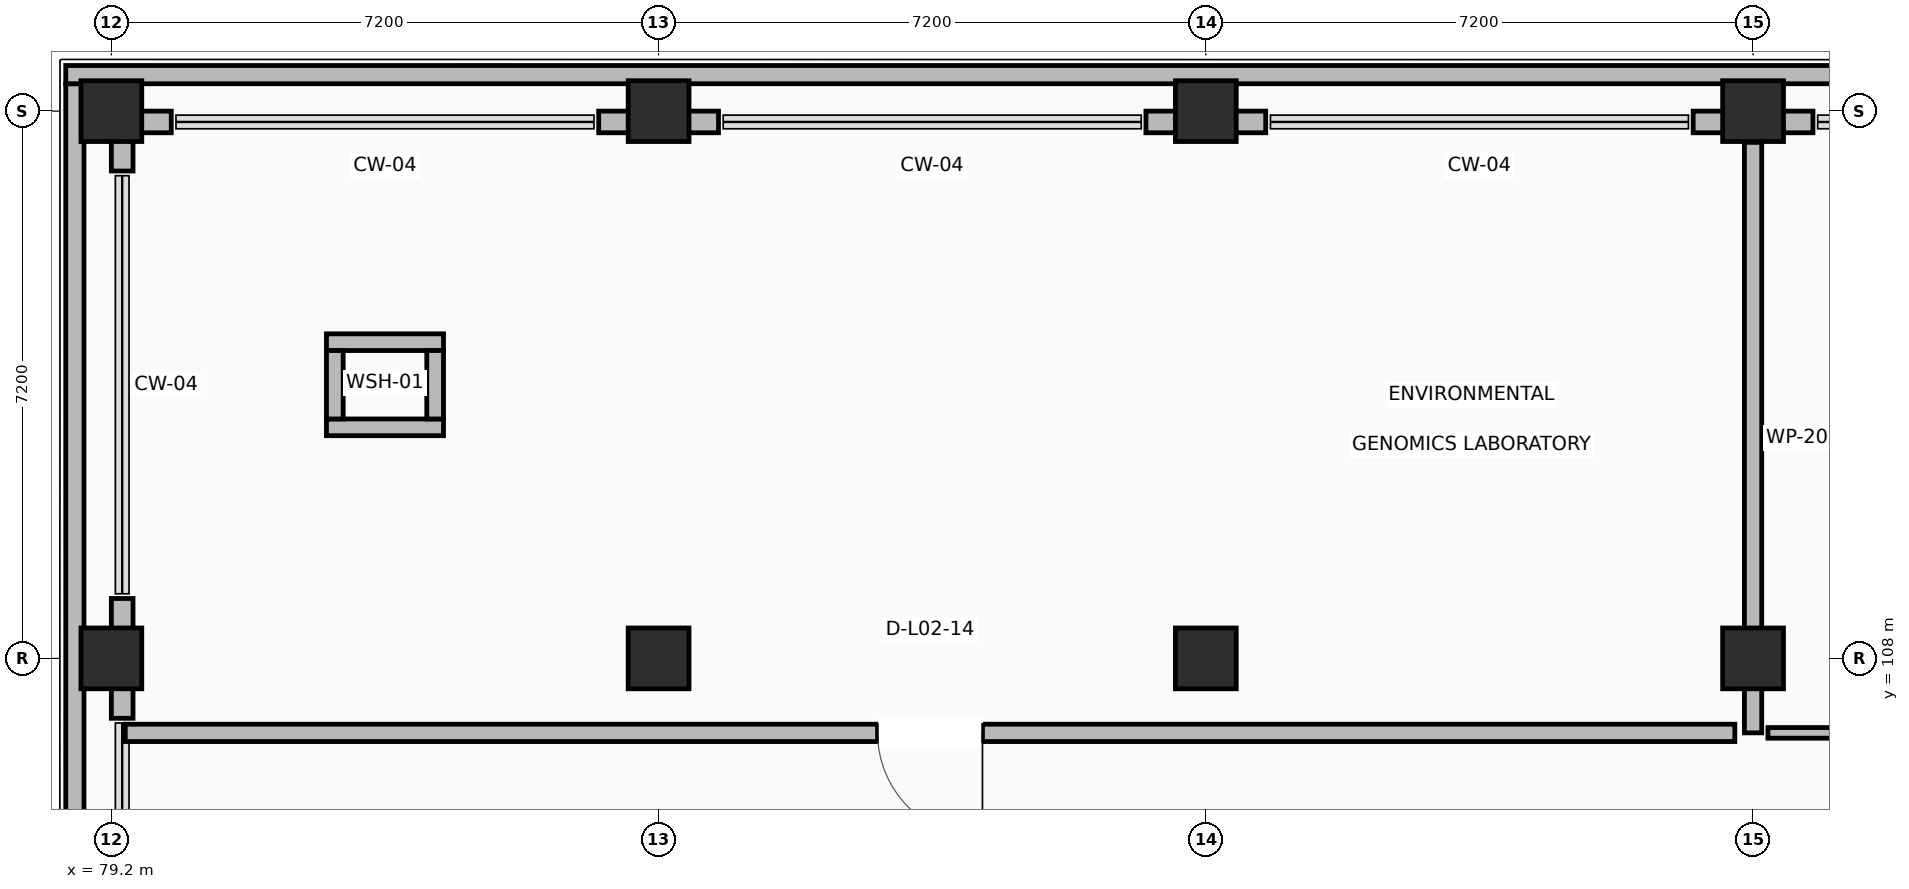
"""IFC4 building model, lengths in metres.
Left out: names, types, materials, properties, quantities, classifications, styles, units other than length and angle.
Written with IfcOpenShell. Run it as: python <this file> out.ifc"""

import sys

from ifc_helpers import new_model, si_unit, direction, frame, frame_2d, origin, origin_2d, place, context, subcontext, project, spatial, rectangle, extrude, element, fill, save


model = new_model("IFC4")
c1 = context("Model", 3, precision=1e-05, world=origin(), true_north=direction((0.0, 1.0)))
c2 = subcontext(c1, "Body", "Model", "MODEL_VIEW")
j1 = project(units=[si_unit("LENGTHUNIT", "METRE"), si_unit("PLANEANGLEUNIT", "RADIAN")], contexts=[c1])
p1 = place(None, origin())
s1 = spatial("IfcSite", under=j1, at=p1, CompositionType="ELEMENT")
p2 = place(p1, origin())
s2 = spatial("IfcBuilding", under=s1, at=p2, CompositionType="ELEMENT")
p3 = place(p2, frame((0.0, 0.0, 9.0)))
s3 = spatial("IfcBuildingStorey", under=s2, at=p3, CompositionType="ELEMENT", Elevation=9.0)
for number, where, z_axis, x_axis in (
    (1, (79.2, 108.0, 0.0), (0.0, 0.0, 1.0), (1.0, 0.0, 0.0)),
    (2, (79.2, 115.2, 0.0), (0.0, 0.0, 1.0), (1.0, 0.0, 0.0)),
    (3, (86.4, 108.0, 0.0), (0.0, 0.0, 1.0), (1.0, 0.0, 0.0)),
    (4, (86.4, 115.2, 0.0), (0.0, 0.0, 1.0), (1.0, 0.0, 0.0)),
    (5, (93.6, 108.0, 0.0), (0.0, 0.0, 1.0), (1.0, 0.0, 0.0)),
    (6, (93.6, 115.2, 0.0), (0.0, 0.0, 1.0), (1.0, 0.0, 0.0)),
    (7, (100.8, 108.0, 0.0), (0.0, 0.0, 1.0), (1.0, 0.0, 0.0)),
    (8, (100.8, 115.2, 0.0), (0.0, 0.0, 1.0), (1.0, 0.0, 0.0)),
):
    element("IfcColumn", number, at=place(p3, frame(where, z_axis=z_axis, x_axis=x_axis)), inside=s3, PredefinedType="COLUMN", context=c2, shape_type="SweptSolid", body=[
        extrude(rectangle(XDim=0.8, YDim=0.8, at=origin_2d()), origin(), (0.0, 0.0, 1.0), 4.22),
    ])
for number, where, z_axis, x_axis in (
    (9, (101.588, 115.058, 0.0), (0.0, 0.0, 1.0), (-1.0, 0.0, 0.0)),
    (10, (94.388, 115.058, 0.0), (0.0, 0.0, 1.0), (-1.0, 0.0, 0.0)),
    (11, (87.188, 115.058, 0.0), (0.0, 0.0, 1.0), (-1.0, 0.0, 0.0)),
):
    element("IfcWall", number, at=place(p3, frame(where, z_axis=z_axis, x_axis=x_axis)), inside=s3, PredefinedType="STANDARD", context=c2, shape_type="SweptSolid", body=[
        extrude(rectangle(XDim=1.576, YDim=0.285, at=frame_2d((0.788, 0.0))), origin(), (0.0, 0.0, 1.0), 3.26),
    ])
p4 = place(p3, frame((79.988, 115.058, 0.0), z_axis=(0.0, 0.0, 1.0), x_axis=(-1.0, 0.0, 0.0)))
e12 = element("IfcWall", 12, at=p4, inside=s3, PredefinedType="STANDARD", context=c2, shape_type="SweptSolid", body=[
    extrude(rectangle(XDim=0.788, YDim=0.285, at=frame_2d((0.394, 0.0))), origin(), (0.0, 0.0, 1.0), 3.26),
])
p5 = place(p3, frame((79.343, 114.915, 0.0), z_axis=(0.0, 0.0, 1.0), x_axis=(0.0, -1.0, 0.0)))
e13 = element("IfcWall", 13, at=p5, inside=s3, PredefinedType="STANDARD", context=c2, shape_type="SweptSolid", body=[
    extrude(rectangle(XDim=0.503, YDim=0.285, at=frame_2d((0.251, 0.0))), origin(), (0.0, 0.0, 1.0), 3.26),
])
p6 = place(p3, frame((79.343, 108.788, 0.0), z_axis=(0.0, 0.0, 1.0), x_axis=(0.0, -1.0, 0.0)))
e14 = element("IfcWall", 14, at=p6, inside=s3, PredefinedType="STANDARD", context=c2, shape_type="SweptSolid", body=[
    extrude(rectangle(XDim=1.576, YDim=0.285, at=frame_2d((0.788, 0.0))), origin(), (0.0, 0.0, 1.0), 3.26),
])
p7 = place(p3, frame((78.72, 93.24, 0.0), z_axis=(0.0, 0.0, 1.0), x_axis=(0.0, 1.0, 0.0)))
e15 = element("IfcWall", 15, at=p7, inside=s3, PredefinedType="PARAPET", context=c2, shape_type="SweptSolid", body=[
    extrude(rectangle(XDim=22.32, YDim=0.24, at=frame_2d((11.16, 0.0))), origin(), (0.0, 0.0, 1.0), 1.12),
])
p8 = place(p3, frame((78.6, 115.68, 0.0), z_axis=(0.0, 0.0, 1.0), x_axis=(1.0, 0.0, 0.0)))
e16 = element("IfcWall", 16, at=p8, inside=s3, PredefinedType="PARAPET", context=c2, shape_type="SweptSolid", body=[
    extrude(rectangle(XDim=73.2, YDim=0.24, at=frame_2d((36.6, 0.0))), origin(), (0.0, 0.0, 1.0), 1.12),
])
for number, where, z_axis, x_axis in (
    (17, (82.03, 111.04, 0.0), (0.0, 0.0, 1.0), (1.0, 0.0, 0.0)),
    (18, (82.03, 112.16, 0.0), (0.0, 0.0, 1.0), (1.0, 0.0, 0.0)),
):
    element("IfcWall", number, at=place(p3, frame(where, z_axis=z_axis, x_axis=x_axis)), inside=s3, PredefinedType="STANDARD", context=c2, shape_type="SweptSolid", body=[
        extrude(rectangle(XDim=1.54, YDim=0.22, at=frame_2d((0.77, 0.0))), origin(), (0.0, 0.0, 1.0), 3.26),
    ])
for number, where, z_axis, x_axis in (
    (19, (82.14, 111.15, 0.0), (0.0, 0.0, 1.0), (0.0, 1.0, 0.0)),
    (20, (83.46, 111.15, 0.0), (0.0, 0.0, 1.0), (0.0, 1.0, 0.0)),
):
    element("IfcWall", number, at=place(p3, frame(where, z_axis=z_axis, x_axis=x_axis)), inside=s3, PredefinedType="STANDARD", context=c2, shape_type="SweptSolid", body=[
        extrude(rectangle(XDim=0.9, YDim=0.22, at=frame_2d((0.45, 0.0))), origin(), (0.0, 0.0, 1.0), 3.26),
    ])
p9 = place(p3, frame((100.8, 114.789, 0.0), z_axis=(0.0, 0.0, 1.0), x_axis=(0.0, -1.0, 0.0)))
e21 = element("IfcWall", 21, at=p9, inside=s3, PredefinedType="PARTITIONING", context=c2, shape_type="SweptSolid", body=[
    extrude(rectangle(XDim=7.769, YDim=0.228, at=frame_2d((3.885, 0.0))), origin(), (0.0, 0.0, 1.0), 3.26),
])
p10 = place(p3, frame((100.56, 107.02, 0.0), z_axis=(0.0, 0.0, 1.0), x_axis=(-1.0, 0.0, 0.0)))
e22 = element("IfcWall", 22, at=p10, inside=s3, PredefinedType="PARTITIONING", context=c2, shape_type="SweptSolid", body=[
    extrude(rectangle(XDim=21.177, YDim=0.228, at=frame_2d((10.588, 0.0))), origin(), (0.0, 0.0, 1.0), 3.26),
])
p11 = place(p10, frame((9.899, 0.0, 0.0)))
e23 = element("IfcOpeningElement", 23, at=p11, cuts=e22, PredefinedType="OPENING", context=c2, shape_type="SweptSolid", body=[
    extrude(rectangle(XDim=1.38, YDim=2.15, at=frame_2d((0.69, 1.075))), frame((0.0, 0.124, 0.0), z_axis=(0.0, -1.0, 0.0), x_axis=(1.0, 0.0, 0.0)), (0.0, 0.0, 1.0), 0.248),
])
p12 = place(p3, frame((125.848, 107.02, 0.0), z_axis=(0.0, 0.0, 1.0), x_axis=(-1.0, 0.0, 0.0)))
e24 = element("IfcWall", 24, at=p12, inside=s3, PredefinedType="PARTITIONING", context=c2, shape_type="SweptSolid", body=[
    extrude(rectangle(XDim=24.852, YDim=0.14, at=frame_2d((12.426, 0.0))), origin(), (0.0, 0.0, 1.0), 3.26),
])
p13 = place(p12, frame((11.936, 0.0, 0.0)))
e25 = element("IfcOpeningElement", 25, at=p13, cuts=e24, PredefinedType="OPENING", context=c2, shape_type="SweptSolid", body=[
    extrude(rectangle(XDim=0.98, YDim=2.1, at=frame_2d((0.49, 1.05))), frame((0.0, 0.08, 0.0), z_axis=(0.0, -1.0, 0.0), x_axis=(1.0, 0.0, 0.0)), (0.0, 0.0, 1.0), 0.16),
])
p14 = place(p11, origin())
e26 = element("IfcDoor", 26, at=p14, inside=s3, OperationType="SINGLE_SWING_LEFT", PredefinedType="DOOR", context=c2, shape_type="SweptSolid", body=[
    extrude(rectangle(XDim=1.38, YDim=2.15, at=frame_2d((0.69, 1.075))), frame((0.0, 0.025, 0.0), z_axis=(0.0, -1.0, 0.0), x_axis=(1.0, 0.0, 0.0)), (0.0, 0.0, 1.0), 0.05),
])
fill(e23, e26)
save(model, sys.argv[1])
